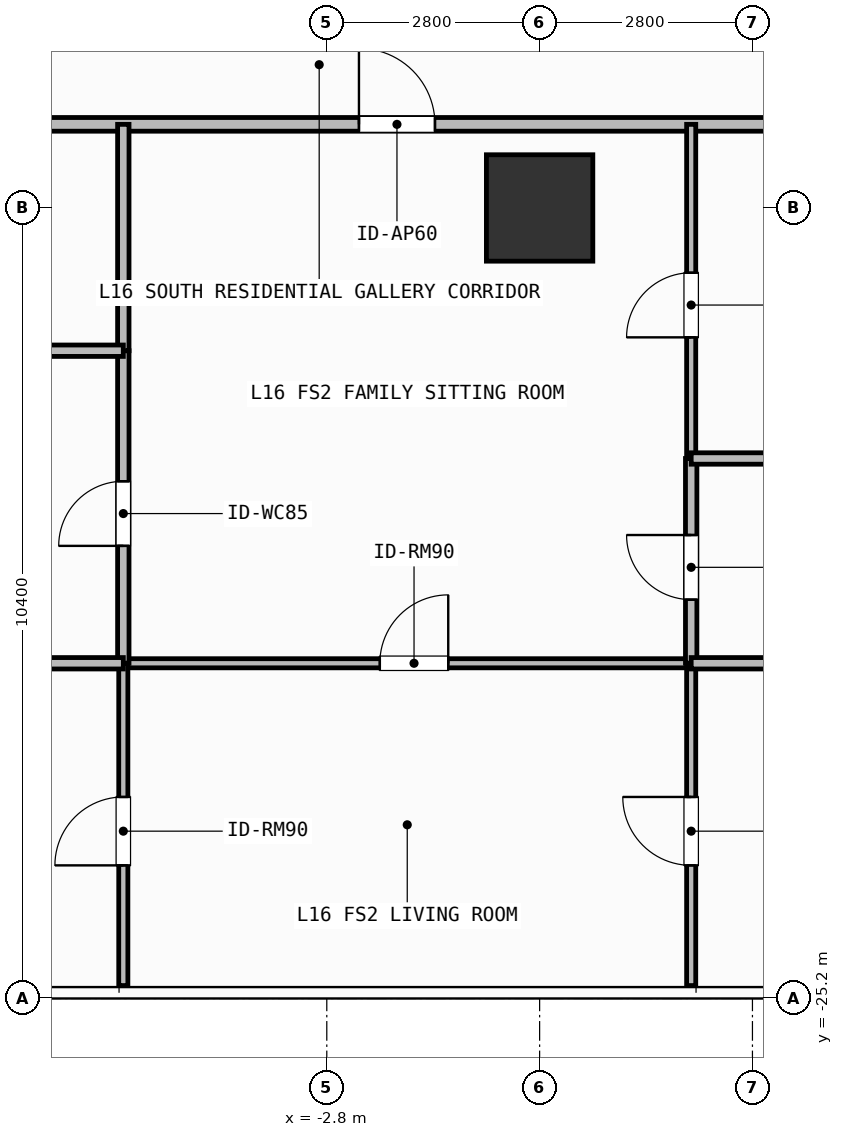
"""IFC4 building model, lengths in metres.
Left out: names, types, materials, properties, quantities, classifications, styles, units other than length and angle.
Written with IfcOpenShell. Run it as: python <this file> out.ifc"""

import sys

from ifc_helpers import new_model, si_unit, direction, frame, frame_2d, origin, origin_2d, place, context, subcontext, project, spatial, rectangle, extrude, element, fill, save


model = new_model("IFC4")
c1 = context("Model", 3, precision=1e-05, world=origin(), true_north=direction((0.0, 1.0)))
c2 = subcontext(c1, "Body", "Model", "MODEL_VIEW")
j1 = project(units=[si_unit("LENGTHUNIT", "METRE"), si_unit("PLANEANGLEUNIT", "RADIAN")], contexts=[c1])
p1 = place(None, origin())
s1 = spatial("IfcSite", under=j1, at=p1, CompositionType="ELEMENT")
p2 = place(p1, origin())
s2 = spatial("IfcBuilding", under=s1, at=p2, CompositionType="ELEMENT")
p3 = place(p2, frame((0.0, 0.0, 61.8)))
s3 = spatial("IfcBuildingStorey", under=s2, at=p3, CompositionType="ELEMENT", Elevation=61.8)
p4 = place(p3, frame((0.0, -14.8, 0.0), z_axis=(0.0, 0.0, 1.0), x_axis=(1.0, 0.0, 0.0)))
e1 = element("IfcColumn", 1, at=p4, inside=s3, PredefinedType="COLUMN", context=c2, shape_type="SweptSolid", body=[
    extrude(rectangle(XDim=1.4, YDim=1.4, at=origin_2d()), origin(), (0.0, 0.0, 1.0), 3.9),
])
p5 = place(p3, frame((-12.225, -13.7, 0.0), z_axis=(0.0, 0.0, 1.0), x_axis=(1.0, 0.0, 0.0)))
e2 = element("IfcWall", 2, at=p5, inside=s3, PredefinedType="PARTITIONING", context=c2, shape_type="SweptSolid", body=[
    extrude(rectangle(XDim=17.467, YDim=0.18, at=frame_2d((8.733, 0.0))), origin(), (0.0, 0.0, 1.0), 3.68),
])
p6 = place(p5, frame((9.848, 0.0, 0.0)))
e3 = element("IfcOpeningElement", 3, at=p6, cuts=e2, PredefinedType="OPENING", context=c2, shape_type="SweptSolid", body=[
    extrude(rectangle(XDim=1.0, YDim=2.2, at=frame_2d((0.5, 1.1))), frame((0.0, 0.1, 0.0), z_axis=(0.0, -1.0, 0.0), x_axis=(1.0, 0.0, 0.0)), (0.0, 0.0, 1.0), 0.2),
])
p7 = place(p3, frame((-5.477, -20.79, 0.0), z_axis=(0.0, 0.0, 1.0), x_axis=(1.0, 0.0, 0.0)))
e4 = element("IfcWall", 4, at=p7, inside=s3, PredefinedType="PARTITIONING", context=c2, shape_type="SweptSolid", body=[
    extrude(rectangle(XDim=7.471, YDim=0.12, at=frame_2d((3.735, 0.0))), origin(), (0.0, 0.0, 1.0), 3.68),
])
p8 = place(p7, frame((3.375, 0.0, 0.0)))
e5 = element("IfcOpeningElement", 5, at=p8, cuts=e4, PredefinedType="OPENING", context=c2, shape_type="SweptSolid", body=[
    extrude(rectangle(XDim=0.9, YDim=2.1, at=frame_2d((0.45, 1.05))), frame((0.0, 0.07, 0.0), z_axis=(0.0, -1.0, 0.0), x_axis=(1.0, 0.0, 0.0)), (0.0, 0.0, 1.0), 0.14),
])
p9 = place(p3, frame((-5.477, -20.79, 0.0), z_axis=(0.0, 0.0, 1.0), x_axis=(0.0, 1.0, 0.0)))
e6 = element("IfcWall", 6, at=p9, inside=s3, PredefinedType="PARTITIONING", context=c2, shape_type="SweptSolid", body=[
    extrude(rectangle(XDim=4.112, YDim=0.15, at=frame_2d((2.056, 0.0))), origin(), (0.0, 0.0, 1.0), 3.68),
])
p10 = place(p9, frame((1.544, 0.0, 0.0)))
e7 = element("IfcOpeningElement", 7, at=p10, cuts=e6, PredefinedType="OPENING", context=c2, shape_type="SweptSolid", body=[
    extrude(rectangle(XDim=0.85, YDim=2.1, at=frame_2d((0.425, 1.05))), frame((0.0, 0.085, 0.0), z_axis=(0.0, -1.0, 0.0), x_axis=(1.0, 0.0, 0.0)), (0.0, 0.0, 1.0), 0.17),
])
p11 = place(p3, frame((-5.477, -16.678, 0.0), z_axis=(0.0, 0.0, 1.0), x_axis=(0.0, 1.0, 0.0)))
e8 = element("IfcWall", 8, at=p11, inside=s3, PredefinedType="PARTITIONING", context=c2, shape_type="SweptSolid", body=[
    extrude(rectangle(XDim=2.978, YDim=0.15, at=frame_2d((1.489, 0.0))), origin(), (0.0, 0.0, 1.0), 3.68),
])
p12 = place(p3, frame((-5.477, -25.03, 0.0), z_axis=(0.0, 0.0, 1.0), x_axis=(0.0, 1.0, 0.0)))
e9 = element("IfcWall", 9, at=p12, inside=s3, PredefinedType="PARTITIONING", context=c2, shape_type="SweptSolid", body=[
    extrude(rectangle(XDim=4.24, YDim=0.12, at=frame_2d((2.12, 0.0))), origin(), (0.0, 0.0, 1.0), 3.68),
])
p13 = place(p12, frame((1.581, 0.0, 0.0)))
e10 = element("IfcOpeningElement", 10, at=p13, cuts=e9, PredefinedType="OPENING", context=c2, shape_type="SweptSolid", body=[
    extrude(rectangle(XDim=0.9, YDim=2.1, at=frame_2d((0.45, 1.05))), frame((0.0, 0.07, 0.0), z_axis=(0.0, -1.0, 0.0), x_axis=(1.0, 0.0, 0.0)), (0.0, 0.0, 1.0), 0.14),
])
p14 = place(p3, frame((1.994, -20.79, 0.0), z_axis=(0.0, 0.0, 1.0), x_axis=(0.0, 1.0, 0.0)))
e11 = element("IfcWall", 11, at=p14, inside=s3, PredefinedType="PARTITIONING", context=c2, shape_type="SweptSolid", body=[
    extrude(rectangle(XDim=2.694, YDim=0.15, at=frame_2d((1.347, 0.0))), origin(), (0.0, 0.0, 1.0), 3.68),
])
p15 = place(p14, frame((0.837, 0.0, 0.0)))
e12 = element("IfcOpeningElement", 12, at=p15, cuts=e11, PredefinedType="OPENING", context=c2, shape_type="SweptSolid", body=[
    extrude(rectangle(XDim=0.85, YDim=2.1, at=frame_2d((0.425, 1.05))), frame((0.0, 0.085, 0.0), z_axis=(0.0, -1.0, 0.0), x_axis=(1.0, 0.0, 0.0)), (0.0, 0.0, 1.0), 0.17),
])
p16 = place(p3, frame((1.994, -18.096, 0.0), z_axis=(0.0, 0.0, 1.0), x_axis=(0.0, 1.0, 0.0)))
e13 = element("IfcWall", 13, at=p16, inside=s3, PredefinedType="PARTITIONING", context=c2, shape_type="SweptSolid", body=[
    extrude(rectangle(XDim=4.396, YDim=0.12, at=frame_2d((2.198, 0.0))), origin(), (0.0, 0.0, 1.0), 3.68),
])
p17 = place(p16, frame((1.594, 0.0, 0.0)))
e14 = element("IfcOpeningElement", 14, at=p17, cuts=e13, PredefinedType="OPENING", context=c2, shape_type="SweptSolid", body=[
    extrude(rectangle(XDim=0.85, YDim=2.1, at=frame_2d((0.425, 1.05))), frame((0.0, 0.07, 0.0), z_axis=(0.0, -1.0, 0.0), x_axis=(1.0, 0.0, 0.0)), (0.0, 0.0, 1.0), 0.14),
])
p18 = place(p3, frame((1.994, -25.03, 0.0), z_axis=(0.0, 0.0, 1.0), x_axis=(0.0, 1.0, 0.0)))
e15 = element("IfcWall", 15, at=p18, inside=s3, PredefinedType="PARTITIONING", context=c2, shape_type="SweptSolid", body=[
    extrude(rectangle(XDim=4.24, YDim=0.12, at=frame_2d((2.12, 0.0))), origin(), (0.0, 0.0, 1.0), 3.68),
])
p19 = place(p18, frame((1.581, 0.0, 0.0)))
e16 = element("IfcOpeningElement", 16, at=p19, cuts=e15, PredefinedType="OPENING", context=c2, shape_type="SweptSolid", body=[
    extrude(rectangle(XDim=0.9, YDim=2.1, at=frame_2d((0.45, 1.05))), frame((0.0, 0.07, 0.0), z_axis=(0.0, -1.0, 0.0), x_axis=(1.0, 0.0, 0.0)), (0.0, 0.0, 1.0), 0.14),
])
p20 = place(p3, frame((-12.225, -16.678, 0.0), z_axis=(0.0, 0.0, 1.0), x_axis=(1.0, 0.0, 0.0)))
e17 = element("IfcWall", 17, at=p20, inside=s3, PredefinedType="PARTITIONING", context=c2, shape_type="SweptSolid", body=[
    extrude(rectangle(XDim=6.748, YDim=0.15, at=frame_2d((3.374, 0.0))), origin(), (0.0, 0.0, 1.0), 3.68),
])
p21 = place(p20, frame((2.859, 0.0, 0.0)))
e18 = element("IfcOpeningElement", 18, at=p21, cuts=e17, PredefinedType="OPENING", context=c2, shape_type="SweptSolid", body=[
    extrude(rectangle(XDim=0.85, YDim=2.1, at=frame_2d((0.425, 1.05))), frame((0.0, 0.085, 0.0), z_axis=(0.0, -1.0, 0.0), x_axis=(1.0, 0.0, 0.0)), (0.0, 0.0, 1.0), 0.17),
])
p22 = place(p3, frame((-12.225, -20.79, 0.0), z_axis=(0.0, 0.0, 1.0), x_axis=(1.0, 0.0, 0.0)))
e19 = element("IfcWall", 19, at=p22, inside=s3, PredefinedType="PARTITIONING", context=c2, shape_type="SweptSolid", body=[
    extrude(rectangle(XDim=6.748, YDim=0.15, at=frame_2d((3.374, 0.0))), origin(), (0.0, 0.0, 1.0), 3.68),
])
for number, where, z_axis, x_axis in (
    (20, (1.994, -18.096, 0.0), (0.0, 0.0, 1.0), (1.0, 0.0, 0.0)),
    (21, (1.994, -20.79, 0.0), (0.0, 0.0, 1.0), (1.0, 0.0, 0.0)),
):
    element("IfcWall", number, at=place(p3, frame(where, z_axis=z_axis, x_axis=x_axis)), inside=s3, PredefinedType="PARTITIONING", context=c2, shape_type="SweptSolid", body=[
        extrude(rectangle(XDim=3.248, YDim=0.15, at=frame_2d((1.624, 0.0))), origin(), (0.0, 0.0, 1.0), 3.68),
    ])
p23 = place(p6, origin())
e22 = element("IfcDoor", 22, at=p23, inside=s3, OperationType="SINGLE_SWING_LEFT", PredefinedType="DOOR", context=c2, shape_type="SweptSolid", body=[
    extrude(rectangle(XDim=1.0, YDim=2.2, at=frame_2d((0.5, 1.1))), frame((0.0, 0.025, 0.0), z_axis=(0.0, -1.0, 0.0), x_axis=(1.0, 0.0, 0.0)), (0.0, 0.0, 1.0), 0.05),
])
fill(e3, e22)
p24 = place(p8, origin())
e23 = element("IfcDoor", 23, at=p24, inside=s3, OperationType="SINGLE_SWING_RIGHT", PredefinedType="DOOR", context=c2, shape_type="SweptSolid", body=[
    extrude(rectangle(XDim=0.9, YDim=2.1, at=frame_2d((0.45, 1.05))), frame((0.0, 0.025, 0.0), z_axis=(0.0, -1.0, 0.0), x_axis=(1.0, 0.0, 0.0)), (0.0, 0.0, 1.0), 0.05),
])
fill(e5, e23)
p25 = place(p10, origin())
e24 = element("IfcDoor", 24, at=p25, inside=s3, OperationType="SINGLE_SWING_LEFT", PredefinedType="DOOR", context=c2, shape_type="SweptSolid", body=[
    extrude(rectangle(XDim=0.85, YDim=2.1, at=frame_2d((0.425, 1.05))), frame((0.0, 0.025, 0.0), z_axis=(0.0, -1.0, 0.0), x_axis=(1.0, 0.0, 0.0)), (0.0, 0.0, 1.0), 0.05),
])
fill(e7, e24)
p26 = place(p13, origin())
e25 = element("IfcDoor", 25, at=p26, inside=s3, OperationType="SINGLE_SWING_LEFT", PredefinedType="DOOR", context=c2, shape_type="SweptSolid", body=[
    extrude(rectangle(XDim=0.9, YDim=2.1, at=frame_2d((0.45, 1.05))), frame((0.0, 0.025, 0.0), z_axis=(0.0, -1.0, 0.0), x_axis=(1.0, 0.0, 0.0)), (0.0, 0.0, 1.0), 0.05),
])
fill(e10, e25)
p27 = place(p15, origin())
e26 = element("IfcDoor", 26, at=p27, inside=s3, OperationType="SINGLE_SWING_RIGHT", PredefinedType="DOOR", context=c2, shape_type="SweptSolid", body=[
    extrude(rectangle(XDim=0.85, YDim=2.1, at=frame_2d((0.425, 1.05))), frame((0.0, 0.025, 0.0), z_axis=(0.0, -1.0, 0.0), x_axis=(1.0, 0.0, 0.0)), (0.0, 0.0, 1.0), 0.05),
])
fill(e12, e26)
p28 = place(p17, origin())
e27 = element("IfcDoor", 27, at=p28, inside=s3, OperationType="SINGLE_SWING_LEFT", PredefinedType="DOOR", context=c2, shape_type="SweptSolid", body=[
    extrude(rectangle(XDim=0.85, YDim=2.1, at=frame_2d((0.425, 1.05))), frame((0.0, 0.025, 0.0), z_axis=(0.0, -1.0, 0.0), x_axis=(1.0, 0.0, 0.0)), (0.0, 0.0, 1.0), 0.05),
])
fill(e14, e27)
p29 = place(p19, origin())
e28 = element("IfcDoor", 28, at=p29, inside=s3, OperationType="SINGLE_SWING_RIGHT", PredefinedType="DOOR", context=c2, shape_type="SweptSolid", body=[
    extrude(rectangle(XDim=0.9, YDim=2.1, at=frame_2d((0.45, 1.05))), frame((0.0, 0.025, 0.0), z_axis=(0.0, -1.0, 0.0), x_axis=(1.0, 0.0, 0.0)), (0.0, 0.0, 1.0), 0.05),
])
fill(e16, e28)
save(model, sys.argv[1])
